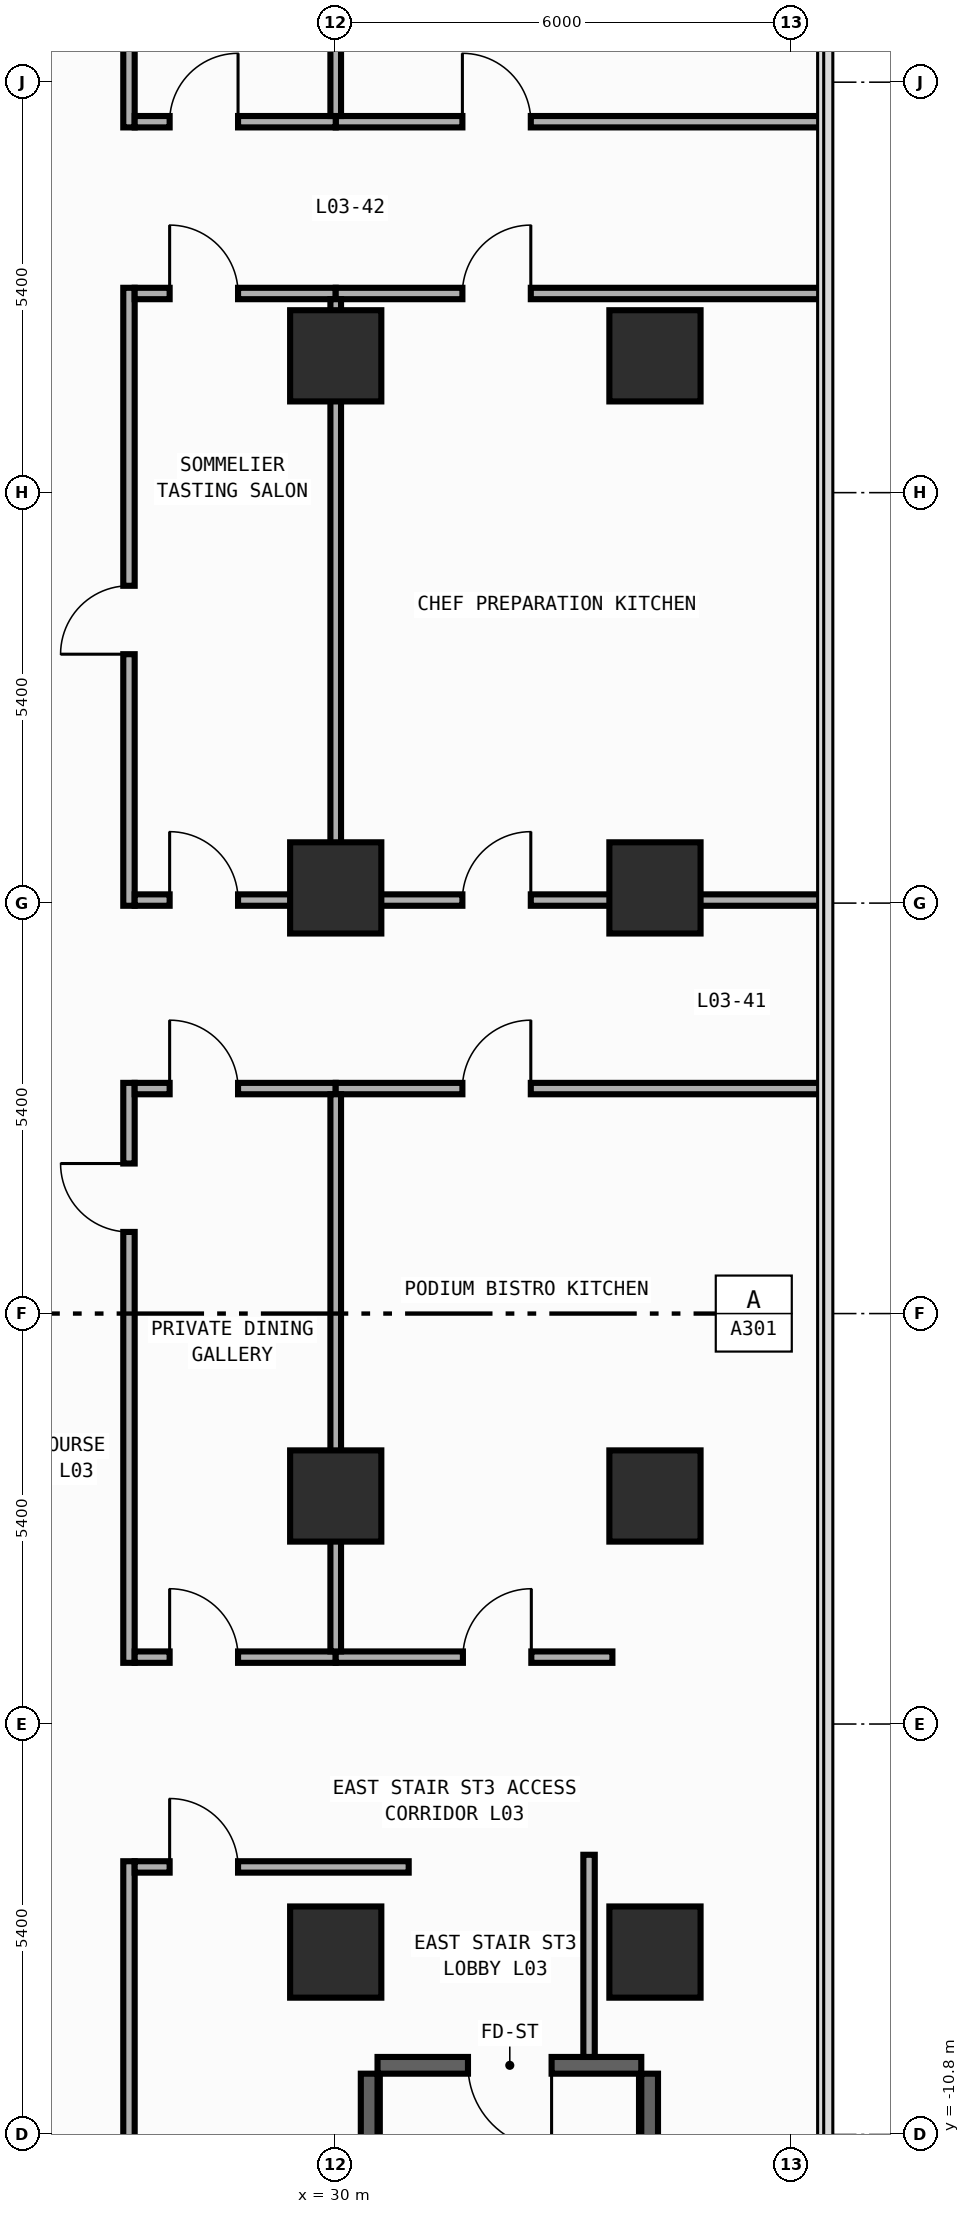
"""IFC4 building model, lengths in metres.
Left out: names, types, materials, properties, quantities, classifications, styles, units other than length and angle.
Written with IfcOpenShell. Run it as: python <this file> out.ifc"""

import sys

from ifc_helpers import new_model, si_unit, direction, frame, frame_2d, origin, origin_2d, place, context, subcontext, project, spatial, rectangle, extrude, element, fill, save


model = new_model("IFC4")
c1 = context("Model", 3, precision=1e-05, world=origin(), true_north=direction((0.0, 1.0)))
c2 = subcontext(c1, "Body", "Model", "MODEL_VIEW")
j1 = project(units=[si_unit("LENGTHUNIT", "METRE"), si_unit("PLANEANGLEUNIT", "RADIAN")], contexts=[c1])
p1 = place(None, origin())
s1 = spatial("IfcSite", under=j1, at=p1, CompositionType="ELEMENT")
p2 = place(p1, origin())
s2 = spatial("IfcBuilding", under=s1, at=p2, CompositionType="ELEMENT")
p3 = place(p2, frame((0.0, 0.0, 11.0)))
s3 = spatial("IfcBuildingStorey", under=s2, at=p3, CompositionType="ELEMENT", Elevation=11.0)
p4 = place(p3, frame((34.02, -9.89, 0.0), z_axis=(0.0, 0.0, 1.0), x_axis=(-1.0, 0.0, 0.0)))
e1 = element("IfcWall", 1, at=p4, inside=s3, PredefinedType="SHEAR", context=c2, shape_type="SweptSolid", body=[
    extrude(rectangle(XDim=3.47, YDim=0.22, at=frame_2d((1.735, 0.0))), origin(), (0.0, 0.0, 1.0), 4.7),
])
p5 = place(p4, frame((1.18, 0.0, 0.0)))
e2 = element("IfcOpeningElement", 2, at=p5, cuts=e1, PredefinedType="OPENING", context=c2, shape_type="SweptSolid", body=[
    extrude(rectangle(XDim=1.1, YDim=2.2, at=frame_2d((0.55, 1.1))), frame((0.0, 0.12, 0.0), z_axis=(0.0, -1.0, 0.0), x_axis=(1.0, 0.0, 0.0)), (0.0, 0.0, 1.0), 0.24),
])
for number, where, z_axis, x_axis in (
    (3, (30.44, -19.8, 0.0), (0.0, 0.0, 1.0), (0.0, 1.0, 0.0)),
    (4, (34.13, -19.8, 0.0), (0.0, 0.0, 1.0), (0.0, 1.0, 0.0)),
):
    element("IfcWall", number, at=place(p3, frame(where, z_axis=z_axis, x_axis=x_axis)), inside=s3, PredefinedType="SHEAR", context=c2, shape_type="SweptSolid", body=[
        extrude(rectangle(XDim=9.8, YDim=0.22, at=frame_2d((4.9, 0.0))), origin(), (0.0, 0.0, 1.0), 4.7),
    ])
for number, where, z_axis, x_axis in (
    (5, (30.0, -8.4, 0.0), (0.0, 0.0, 1.0), (1.0, 0.0, 0.0)),
    (6, (30.0, -2.4, 0.0), (0.0, 0.0, 1.0), (1.0, 0.0, 0.0)),
    (7, (30.0, 5.6, 0.0), (0.0, 0.0, 1.0), (1.0, 0.0, 0.0)),
    (8, (30.0, 12.6, 0.0), (0.0, 0.0, 1.0), (1.0, 0.0, 0.0)),
    (9, (34.2, -8.4, 0.0), (0.0, 0.0, 1.0), (1.0, 0.0, 0.0)),
    (10, (34.2, -2.4, 0.0), (0.0, 0.0, 1.0), (1.0, 0.0, 0.0)),
    (11, (34.2, 5.6, 0.0), (0.0, 0.0, 1.0), (1.0, 0.0, 0.0)),
    (12, (34.2, 12.6, 0.0), (0.0, 0.0, 1.0), (1.0, 0.0, 0.0)),
):
    element("IfcColumn", number, at=place(p3, frame(where, z_axis=z_axis, x_axis=x_axis)), inside=s3, PredefinedType="COLUMN", context=c2, shape_type="SweptSolid", body=[
        extrude(rectangle(XDim=1.2, YDim=1.2, at=origin_2d()), origin(), (0.0, 0.0, 1.0), 5.0),
    ])
p6 = place(p3, frame((27.28, -4.595, 0.0), z_axis=(0.0, 0.0, 1.0), x_axis=(0.0, 1.0, 0.0)))
e13 = element("IfcWall", 13, at=p6, inside=s3, PredefinedType="PARTITIONING", context=c2, shape_type="SweptSolid", body=[
    extrude(rectangle(XDim=7.63, YDim=0.15, at=frame_2d((3.815, 0.0))), origin(), (0.0, 0.0, 1.0), 4.7),
])
p7 = place(p6, frame((5.669, 0.0, 0.0)))
e14 = element("IfcOpeningElement", 14, at=p7, cuts=e13, PredefinedType="OPENING", context=c2, shape_type="SweptSolid", body=[
    extrude(rectangle(XDim=0.9, YDim=2.15, at=frame_2d((0.45, 1.075))), frame((0.0, 0.085, 0.0), z_axis=(0.0, -1.0, 0.0), x_axis=(1.0, 0.0, 0.0)), (0.0, 0.0, 1.0), 0.17),
])
p8 = place(p3, frame((27.28, 5.365, 0.0), z_axis=(0.0, 0.0, 1.0), x_axis=(0.0, 1.0, 0.0)))
e15 = element("IfcWall", 15, at=p8, inside=s3, PredefinedType="PARTITIONING", context=c2, shape_type="SweptSolid", body=[
    extrude(rectangle(XDim=8.13, YDim=0.15, at=frame_2d((4.065, 0.0))), origin(), (0.0, 0.0, 1.0), 4.7),
])
p9 = place(p8, frame((3.31, 0.0, 0.0)))
e16 = element("IfcOpeningElement", 16, at=p9, cuts=e15, PredefinedType="OPENING", context=c2, shape_type="SweptSolid", body=[
    extrude(rectangle(XDim=0.9, YDim=2.15, at=frame_2d((0.45, 1.075))), frame((0.0, 0.085, 0.0), z_axis=(0.0, -1.0, 0.0), x_axis=(1.0, 0.0, 0.0)), (0.0, 0.0, 1.0), 0.17),
])
p10 = place(p3, frame((27.28, -20.42, 0.0), z_axis=(0.0, 0.0, 1.0), x_axis=(0.0, 1.0, 0.0)))
e17 = element("IfcWall", 17, at=p10, inside=s3, PredefinedType="PARTITIONING", context=c2, shape_type="SweptSolid", body=[
    extrude(rectangle(XDim=13.215, YDim=0.15, at=frame_2d((6.607, 0.0))), origin(), (0.0, 0.0, 1.0), 4.7),
])
p11 = place(p10, frame((3.919, 0.0, 0.0)))
e18 = element("IfcOpeningElement", 18, at=p11, cuts=e17, PredefinedType="OPENING", context=c2, shape_type="SweptSolid", body=[
    extrude(rectangle(XDim=0.9, YDim=2.15, at=frame_2d((0.45, 1.075))), frame((0.0, 0.085, 0.0), z_axis=(0.0, -1.0, 0.0), x_axis=(1.0, 0.0, 0.0)), (0.0, 0.0, 1.0), 0.17),
])
p12 = place(p3, frame((27.28, 15.605, 0.0), z_axis=(0.0, 0.0, 1.0), x_axis=(0.0, 1.0, 0.0)))
e19 = element("IfcWall", 19, at=p12, inside=s3, PredefinedType="PARTITIONING", context=c2, shape_type="SweptSolid", body=[
    extrude(rectangle(XDim=11.644, YDim=0.15, at=frame_2d((5.822, 0.0))), origin(), (0.0, 0.0, 1.0), 4.7),
])
p13 = place(p12, frame((1.262, 0.0, 0.0)))
e20 = element("IfcOpeningElement", 20, at=p13, cuts=e19, PredefinedType="OPENING", context=c2, shape_type="SweptSolid", body=[
    extrude(rectangle(XDim=0.9, YDim=2.15, at=frame_2d((0.45, 1.075))), frame((0.0, 0.085, 0.0), z_axis=(0.0, -1.0, 0.0), x_axis=(1.0, 0.0, 0.0)), (0.0, 0.0, 1.0), 0.17),
])
p14 = place(p3, frame((27.355, 2.96, 0.0), z_axis=(0.0, 0.0, 1.0), x_axis=(1.0, 0.0, 0.0)))
e21 = element("IfcWall", 21, at=p14, inside=s3, PredefinedType="PARTITIONING", context=c2, shape_type="SweptSolid", body=[
    extrude(rectangle(XDim=2.645, YDim=0.15, at=frame_2d((1.323, 0.0))), origin(), (0.0, 0.0, 1.0), 4.7),
])
p15 = place(p14, frame((0.46, 0.0, 0.0)))
e22 = element("IfcOpeningElement", 22, at=p15, cuts=e21, PredefinedType="OPENING", context=c2, shape_type="SweptSolid", body=[
    extrude(rectangle(XDim=0.9, YDim=2.15, at=frame_2d((0.45, 1.075))), frame((0.0, 0.085, 0.0), z_axis=(0.0, -1.0, 0.0), x_axis=(1.0, 0.0, 0.0)), (0.0, 0.0, 1.0), 0.17),
])
p16 = place(p3, frame((30.0, 2.96, 0.0), z_axis=(0.0, 0.0, 1.0), x_axis=(1.0, 0.0, 0.0)))
e23 = element("IfcWall", 23, at=p16, inside=s3, PredefinedType="PARTITIONING", context=c2, shape_type="SweptSolid", body=[
    extrude(rectangle(XDim=6.445, YDim=0.15, at=frame_2d((3.223, 0.0))), origin(), (0.0, 0.0, 1.0), 4.7),
])
p17 = place(p16, frame((1.667, 0.0, 0.0)))
e24 = element("IfcOpeningElement", 24, at=p17, cuts=e23, PredefinedType="OPENING", context=c2, shape_type="SweptSolid", body=[
    extrude(rectangle(XDim=0.9, YDim=2.15, at=frame_2d((0.45, 1.075))), frame((0.0, 0.085, 0.0), z_axis=(0.0, -1.0, 0.0), x_axis=(1.0, 0.0, 0.0)), (0.0, 0.0, 1.0), 0.17),
])
p18 = place(p3, frame((27.355, 5.44, 0.0), z_axis=(0.0, 0.0, 1.0), x_axis=(1.0, 0.0, 0.0)))
e25 = element("IfcWall", 25, at=p18, inside=s3, PredefinedType="PARTITIONING", context=c2, shape_type="SweptSolid", body=[
    extrude(rectangle(XDim=2.645, YDim=0.15, at=frame_2d((1.323, 0.0))), origin(), (0.0, 0.0, 1.0), 3.8),
])
p19 = place(p18, frame((0.46, 0.0, 0.0)))
e26 = element("IfcOpeningElement", 26, at=p19, cuts=e25, PredefinedType="OPENING", context=c2, shape_type="SweptSolid", body=[
    extrude(rectangle(XDim=0.9, YDim=2.15, at=frame_2d((0.45, 1.075))), frame((0.0, 0.085, 0.0), z_axis=(0.0, -1.0, 0.0), x_axis=(1.0, 0.0, 0.0)), (0.0, 0.0, 1.0), 0.17),
])
p20 = place(p3, frame((30.0, 5.44, 0.0), z_axis=(0.0, 0.0, 1.0), x_axis=(1.0, 0.0, 0.0)))
e27 = element("IfcWall", 27, at=p20, inside=s3, PredefinedType="PARTITIONING", context=c2, shape_type="SweptSolid", body=[
    extrude(rectangle(XDim=6.445, YDim=0.15, at=frame_2d((3.223, 0.0))), origin(), (0.0, 0.0, 1.0), 3.8),
])
p21 = place(p20, frame((1.667, 0.0, 0.0)))
e28 = element("IfcOpeningElement", 28, at=p21, cuts=e27, PredefinedType="OPENING", context=c2, shape_type="SweptSolid", body=[
    extrude(rectangle(XDim=0.9, YDim=2.15, at=frame_2d((0.45, 1.075))), frame((0.0, 0.085, 0.0), z_axis=(0.0, -1.0, 0.0), x_axis=(1.0, 0.0, 0.0)), (0.0, 0.0, 1.0), 0.17),
])
p22 = place(p3, frame((27.355, 13.42, 0.0), z_axis=(0.0, 0.0, 1.0), x_axis=(1.0, 0.0, 0.0)))
e29 = element("IfcWall", 29, at=p22, inside=s3, PredefinedType="PARTITIONING", context=c2, shape_type="SweptSolid", body=[
    extrude(rectangle(XDim=2.645, YDim=0.15, at=frame_2d((1.323, 0.0))), origin(), (0.0, 0.0, 1.0), 4.7),
])
p23 = place(p22, frame((0.46, 0.0, 0.0)))
e30 = element("IfcOpeningElement", 30, at=p23, cuts=e29, PredefinedType="OPENING", context=c2, shape_type="SweptSolid", body=[
    extrude(rectangle(XDim=0.9, YDim=2.15, at=frame_2d((0.45, 1.075))), frame((0.0, 0.085, 0.0), z_axis=(0.0, -1.0, 0.0), x_axis=(1.0, 0.0, 0.0)), (0.0, 0.0, 1.0), 0.17),
])
p24 = place(p3, frame((30.0, 13.42, 0.0), z_axis=(0.0, 0.0, 1.0), x_axis=(1.0, 0.0, 0.0)))
e31 = element("IfcWall", 31, at=p24, inside=s3, PredefinedType="PARTITIONING", context=c2, shape_type="SweptSolid", body=[
    extrude(rectangle(XDim=6.445, YDim=0.15, at=frame_2d((3.223, 0.0))), origin(), (0.0, 0.0, 1.0), 4.7),
])
p25 = place(p24, frame((1.667, 0.0, 0.0)))
e32 = element("IfcOpeningElement", 32, at=p25, cuts=e31, PredefinedType="OPENING", context=c2, shape_type="SweptSolid", body=[
    extrude(rectangle(XDim=0.9, YDim=2.15, at=frame_2d((0.45, 1.075))), frame((0.0, 0.085, 0.0), z_axis=(0.0, -1.0, 0.0), x_axis=(1.0, 0.0, 0.0)), (0.0, 0.0, 1.0), 0.17),
])
p26 = place(p3, frame((30.0, 15.68, 0.0), z_axis=(0.0, 0.0, 1.0), x_axis=(1.0, 0.0, 0.0)))
e33 = element("IfcWall", 33, at=p26, inside=s3, PredefinedType="PARTITIONING", context=c2, shape_type="SweptSolid", body=[
    extrude(rectangle(XDim=6.445, YDim=0.15, at=frame_2d((3.223, 0.0))), origin(), (0.0, 0.0, 1.0), 4.7),
])
p27 = place(p26, frame((1.667, 0.0, 0.0)))
e34 = element("IfcOpeningElement", 34, at=p27, cuts=e33, PredefinedType="OPENING", context=c2, shape_type="SweptSolid", body=[
    extrude(rectangle(XDim=0.9, YDim=2.15, at=frame_2d((0.45, 1.075))), frame((0.0, 0.085, 0.0), z_axis=(0.0, -1.0, 0.0), x_axis=(1.0, 0.0, 0.0)), (0.0, 0.0, 1.0), 0.17),
])
p28 = place(p3, frame((27.355, 15.68, 0.0), z_axis=(0.0, 0.0, 1.0), x_axis=(1.0, 0.0, 0.0)))
e35 = element("IfcWall", 35, at=p28, inside=s3, PredefinedType="PARTITIONING", context=c2, shape_type="SweptSolid", body=[
    extrude(rectangle(XDim=2.645, YDim=0.15, at=frame_2d((1.323, 0.0))), origin(), (0.0, 0.0, 1.0), 4.7),
])
p29 = place(p28, frame((0.46, 0.0, 0.0)))
e36 = element("IfcOpeningElement", 36, at=p29, cuts=e35, PredefinedType="OPENING", context=c2, shape_type="SweptSolid", body=[
    extrude(rectangle(XDim=0.9, YDim=2.15, at=frame_2d((0.45, 1.075))), frame((0.0, 0.085, 0.0), z_axis=(0.0, -1.0, 0.0), x_axis=(1.0, 0.0, 0.0)), (0.0, 0.0, 1.0), 0.17),
])
p30 = place(p3, frame((27.355, -4.52, 0.0), z_axis=(0.0, 0.0, 1.0), x_axis=(1.0, 0.0, 0.0)))
e37 = element("IfcWall", 37, at=p30, inside=s3, PredefinedType="PARTITIONING", context=c2, shape_type="SweptSolid", body=[
    extrude(rectangle(XDim=2.645, YDim=0.15, at=frame_2d((1.323, 0.0))), origin(), (0.0, 0.0, 1.0), 4.7),
])
p31 = place(p30, frame((0.46, 0.0, 0.0)))
e38 = element("IfcOpeningElement", 38, at=p31, cuts=e37, PredefinedType="OPENING", context=c2, shape_type="SweptSolid", body=[
    extrude(rectangle(XDim=0.9, YDim=2.15, at=frame_2d((0.45, 1.075))), frame((0.0, 0.085, 0.0), z_axis=(0.0, -1.0, 0.0), x_axis=(1.0, 0.0, 0.0)), (0.0, 0.0, 1.0), 0.17),
])
p32 = place(p3, frame((30.0, -4.52, 0.0), z_axis=(0.0, 0.0, 1.0), x_axis=(1.0, 0.0, 0.0)))
e39 = element("IfcWall", 39, at=p32, inside=s3, PredefinedType="PARTITIONING", context=c2, shape_type="SweptSolid", body=[
    extrude(rectangle(XDim=3.64, YDim=0.15, at=frame_2d((1.82, 0.0))), origin(), (0.0, 0.0, 1.0), 4.7),
])
p33 = place(p32, frame((1.673, 0.0, 0.0)))
e40 = element("IfcOpeningElement", 40, at=p33, cuts=e39, PredefinedType="OPENING", context=c2, shape_type="SweptSolid", body=[
    extrude(rectangle(XDim=0.9, YDim=2.15, at=frame_2d((0.45, 1.075))), frame((0.0, 0.085, 0.0), z_axis=(0.0, -1.0, 0.0), x_axis=(1.0, 0.0, 0.0)), (0.0, 0.0, 1.0), 0.17),
])
p34 = place(p3, frame((27.355, -7.28, 0.0), z_axis=(0.0, 0.0, 1.0), x_axis=(1.0, 0.0, 0.0)))
e41 = element("IfcWall", 41, at=p34, inside=s3, PredefinedType="PARTITIONING", context=c2, shape_type="SweptSolid", body=[
    extrude(rectangle(XDim=3.605, YDim=0.15, at=frame_2d((1.802, 0.0))), origin(), (0.0, 0.0, 1.0), 4.7),
])
p35 = place(p34, frame((0.46, 0.0, 0.0)))
e42 = element("IfcOpeningElement", 42, at=p35, cuts=e41, PredefinedType="OPENING", context=c2, shape_type="SweptSolid", body=[
    extrude(rectangle(XDim=0.9, YDim=2.15, at=frame_2d((0.45, 1.075))), frame((0.0, 0.085, 0.0), z_axis=(0.0, -1.0, 0.0), x_axis=(1.0, 0.0, 0.0)), (0.0, 0.0, 1.0), 0.17),
])
p36 = place(p3, frame((33.333, -9.78, 0.0), z_axis=(0.0, 0.0, 1.0), x_axis=(0.0, 1.0, 0.0)))
e43 = element("IfcWall", 43, at=p36, inside=s3, PredefinedType="PARTITIONING", context=c2, shape_type="SweptSolid", body=[
    extrude(rectangle(XDim=2.66, YDim=0.15, at=frame_2d((1.33, 0.0))), origin(), (0.0, 0.0, 1.0), 4.7),
])
p37 = place(p3, frame((30.0, -4.445, 0.0), z_axis=(0.0, 0.0, 1.0), x_axis=(0.0, 1.0, 0.0)))
e44 = element("IfcWall", 44, at=p37, inside=s3, PredefinedType="PARTITIONING", context=c2, shape_type="SweptSolid", body=[
    extrude(rectangle(XDim=7.33, YDim=0.14, at=frame_2d((3.665, 0.0))), origin(), (0.0, 0.0, 1.0), 3.8),
])
p38 = place(p3, frame((30.0, 5.515, 0.0), z_axis=(0.0, 0.0, 1.0), x_axis=(0.0, 1.0, 0.0)))
e45 = element("IfcWall", 45, at=p38, inside=s3, PredefinedType="PARTITIONING", context=c2, shape_type="SweptSolid", body=[
    extrude(rectangle(XDim=7.83, YDim=0.14, at=frame_2d((3.915, 0.0))), origin(), (0.0, 0.0, 1.0), 3.8),
])
p39 = place(p3, frame((30.0, 15.755, 0.0), z_axis=(0.0, 0.0, 1.0), x_axis=(0.0, 1.0, 0.0)))
e46 = element("IfcWall", 46, at=p39, inside=s3, PredefinedType="PARTITIONING", context=c2, shape_type="SweptSolid", body=[
    extrude(rectangle(XDim=11.486, YDim=0.14, at=frame_2d((5.743, 0.0))), origin(), (0.0, 0.0, 1.0), 3.8),
])
p40 = place(p5, origin())
e47 = element("IfcDoor", 47, at=p40, inside=s3, OperationType="SINGLE_SWING_LEFT", PredefinedType="DOOR", context=c2, shape_type="SweptSolid", body=[
    extrude(rectangle(XDim=1.1, YDim=2.2, at=frame_2d((0.55, 1.1))), frame((0.0, 0.025, 0.0), z_axis=(0.0, -1.0, 0.0), x_axis=(1.0, 0.0, 0.0)), (0.0, 0.0, 1.0), 0.05),
])
fill(e2, e47)
p41 = place(p7, origin())
e48 = element("IfcDoor", 48, at=p41, inside=s3, OperationType="SINGLE_SWING_RIGHT", PredefinedType="DOOR", context=c2, shape_type="SweptSolid", body=[
    extrude(rectangle(XDim=0.9, YDim=2.15, at=frame_2d((0.45, 1.075))), frame((0.0, 0.025, 0.0), z_axis=(0.0, -1.0, 0.0), x_axis=(1.0, 0.0, 0.0)), (0.0, 0.0, 1.0), 0.05),
])
fill(e14, e48)
p42 = place(p9, origin())
e49 = element("IfcDoor", 49, at=p42, inside=s3, OperationType="SINGLE_SWING_LEFT", PredefinedType="DOOR", context=c2, shape_type="SweptSolid", body=[
    extrude(rectangle(XDim=0.9, YDim=2.15, at=frame_2d((0.45, 1.075))), frame((0.0, 0.025, 0.0), z_axis=(0.0, -1.0, 0.0), x_axis=(1.0, 0.0, 0.0)), (0.0, 0.0, 1.0), 0.05),
])
fill(e16, e49)
p43 = place(p15, origin())
e50 = element("IfcDoor", 50, at=p43, inside=s3, OperationType="SINGLE_SWING_LEFT", PredefinedType="DOOR", context=c2, shape_type="SweptSolid", body=[
    extrude(rectangle(XDim=0.9, YDim=2.15, at=frame_2d((0.45, 1.075))), frame((0.0, 0.025, 0.0), z_axis=(0.0, -1.0, 0.0), x_axis=(1.0, 0.0, 0.0)), (0.0, 0.0, 1.0), 0.05),
])
fill(e22, e50)
p44 = place(p17, origin())
e51 = element("IfcDoor", 51, at=p44, inside=s3, OperationType="SINGLE_SWING_RIGHT", PredefinedType="DOOR", context=c2, shape_type="SweptSolid", body=[
    extrude(rectangle(XDim=0.9, YDim=2.15, at=frame_2d((0.45, 1.075))), frame((0.0, 0.025, 0.0), z_axis=(0.0, -1.0, 0.0), x_axis=(1.0, 0.0, 0.0)), (0.0, 0.0, 1.0), 0.05),
])
fill(e24, e51)
p45 = place(p19, origin())
e52 = element("IfcDoor", 52, at=p45, inside=s3, OperationType="SINGLE_SWING_LEFT", PredefinedType="DOOR", context=c2, shape_type="SweptSolid", body=[
    extrude(rectangle(XDim=0.9, YDim=2.15, at=frame_2d((0.45, 1.075))), frame((0.0, 0.025, 0.0), z_axis=(0.0, -1.0, 0.0), x_axis=(1.0, 0.0, 0.0)), (0.0, 0.0, 1.0), 0.05),
])
fill(e26, e52)
p46 = place(p21, origin())
e53 = element("IfcDoor", 53, at=p46, inside=s3, OperationType="SINGLE_SWING_RIGHT", PredefinedType="DOOR", context=c2, shape_type="SweptSolid", body=[
    extrude(rectangle(XDim=0.9, YDim=2.15, at=frame_2d((0.45, 1.075))), frame((0.0, 0.025, 0.0), z_axis=(0.0, -1.0, 0.0), x_axis=(1.0, 0.0, 0.0)), (0.0, 0.0, 1.0), 0.05),
])
fill(e28, e53)
p47 = place(p23, origin())
e54 = element("IfcDoor", 54, at=p47, inside=s3, OperationType="SINGLE_SWING_LEFT", PredefinedType="DOOR", context=c2, shape_type="SweptSolid", body=[
    extrude(rectangle(XDim=0.9, YDim=2.15, at=frame_2d((0.45, 1.075))), frame((0.0, 0.025, 0.0), z_axis=(0.0, -1.0, 0.0), x_axis=(1.0, 0.0, 0.0)), (0.0, 0.0, 1.0), 0.05),
])
fill(e30, e54)
p48 = place(p25, origin())
e55 = element("IfcDoor", 55, at=p48, inside=s3, OperationType="SINGLE_SWING_RIGHT", PredefinedType="DOOR", context=c2, shape_type="SweptSolid", body=[
    extrude(rectangle(XDim=0.9, YDim=2.15, at=frame_2d((0.45, 1.075))), frame((0.0, 0.025, 0.0), z_axis=(0.0, -1.0, 0.0), x_axis=(1.0, 0.0, 0.0)), (0.0, 0.0, 1.0), 0.05),
])
fill(e32, e55)
p49 = place(p27, origin())
e56 = element("IfcDoor", 56, at=p49, inside=s3, OperationType="SINGLE_SWING_LEFT", PredefinedType="DOOR", context=c2, shape_type="SweptSolid", body=[
    extrude(rectangle(XDim=0.9, YDim=2.15, at=frame_2d((0.45, 1.075))), frame((0.0, 0.025, 0.0), z_axis=(0.0, -1.0, 0.0), x_axis=(1.0, 0.0, 0.0)), (0.0, 0.0, 1.0), 0.05),
])
fill(e34, e56)
p50 = place(p29, origin())
e57 = element("IfcDoor", 57, at=p50, inside=s3, OperationType="SINGLE_SWING_RIGHT", PredefinedType="DOOR", context=c2, shape_type="SweptSolid", body=[
    extrude(rectangle(XDim=0.9, YDim=2.15, at=frame_2d((0.45, 1.075))), frame((0.0, 0.025, 0.0), z_axis=(0.0, -1.0, 0.0), x_axis=(1.0, 0.0, 0.0)), (0.0, 0.0, 1.0), 0.05),
])
fill(e36, e57)
p51 = place(p31, origin())
e58 = element("IfcDoor", 58, at=p51, inside=s3, OperationType="SINGLE_SWING_LEFT", PredefinedType="DOOR", context=c2, shape_type="SweptSolid", body=[
    extrude(rectangle(XDim=0.9, YDim=2.15, at=frame_2d((0.45, 1.075))), frame((0.0, 0.025, 0.0), z_axis=(0.0, -1.0, 0.0), x_axis=(1.0, 0.0, 0.0)), (0.0, 0.0, 1.0), 0.05),
])
fill(e38, e58)
p52 = place(p33, origin())
e59 = element("IfcDoor", 59, at=p52, inside=s3, OperationType="SINGLE_SWING_RIGHT", PredefinedType="DOOR", context=c2, shape_type="SweptSolid", body=[
    extrude(rectangle(XDim=0.9, YDim=2.15, at=frame_2d((0.45, 1.075))), frame((0.0, 0.025, 0.0), z_axis=(0.0, -1.0, 0.0), x_axis=(1.0, 0.0, 0.0)), (0.0, 0.0, 1.0), 0.05),
])
fill(e40, e59)
p53 = place(p35, origin())
e60 = element("IfcDoor", 60, at=p53, inside=s3, OperationType="SINGLE_SWING_LEFT", PredefinedType="DOOR", context=c2, shape_type="SweptSolid", body=[
    extrude(rectangle(XDim=0.9, YDim=2.15, at=frame_2d((0.45, 1.075))), frame((0.0, 0.025, 0.0), z_axis=(0.0, -1.0, 0.0), x_axis=(1.0, 0.0, 0.0)), (0.0, 0.0, 1.0), 0.05),
])
fill(e42, e60)
save(model, sys.argv[1])
